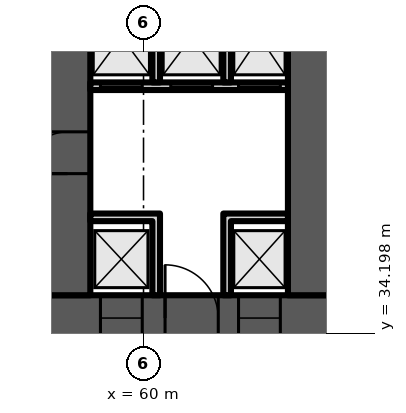
"""IFC4 building model, lengths in metres.
Left out: names, types, materials, properties, quantities, classifications, styles, units other than length and angle.
Written with IfcOpenShell. Run it as: python <this file> out.ifc"""

import sys

from ifc_helpers import new_model, si_unit, direction, frame, frame_2d, origin, place, context, subcontext, project, spatial, polyline, rectangle, outline, extrude, element, fill, save


model = new_model("IFC4")
c1 = context("Model", 3, precision=1e-05, world=origin(), true_north=direction((0.0, 1.0)))
c2 = subcontext(c1, "Body", "Model", "MODEL_VIEW")
j1 = project(units=[si_unit("LENGTHUNIT", "METRE"), si_unit("PLANEANGLEUNIT", "RADIAN")], contexts=[c1])
p1 = place(None, origin())
s1 = spatial("IfcSite", under=j1, at=p1, CompositionType="ELEMENT")
p2 = place(p1, origin())
s2 = spatial("IfcBuilding", under=s1, at=p2, CompositionType="ELEMENT")
p3 = place(p2, frame((0.0, 0.0, 91.9)))
s3 = spatial("IfcBuildingStorey", under=s2, at=p3, CompositionType="ELEMENT", Elevation=91.9)
p4 = place(p3, frame((9.0, 34.6, 0.0), z_axis=(0.0, 0.0, 1.0), x_axis=(1.0, 0.0, 0.0)))
e1 = element("IfcWall", 1, at=p4, inside=s3, PredefinedType="SHEAR", context=c2, shape_type="SweptSolid", body=[
    extrude(rectangle(XDim=56.0, YDim=1.2, at=frame_2d((28.0, 0.0))), origin(), (0.0, 0.0, 1.0), 4.8),
])
p5 = place(p4, frame((3.3, 0.0, 0.0)))
e2 = element("IfcOpeningElement", 2, at=p5, cuts=e1, PredefinedType="OPENING", context=c2, shape_type="SweptSolid", body=[
    extrude(rectangle(XDim=1.0, YDim=2.1, at=frame_2d((0.5, 1.05))), frame((0.0, 0.61, 0.0), z_axis=(0.0, -1.0, 0.0), x_axis=(1.0, 0.0, 0.0)), (0.0, 0.0, 1.0), 1.22),
])
p6 = place(p4, frame((7.867, 0.0, 0.0)))
e3 = element("IfcOpeningElement", 3, at=p6, cuts=e1, PredefinedType="OPENING", context=c2, shape_type="SweptSolid", body=[
    extrude(rectangle(XDim=1.1, YDim=2.1, at=frame_2d((0.55, 1.05))), frame((0.0, 0.61, 0.0), z_axis=(0.0, -1.0, 0.0), x_axis=(1.0, 0.0, 0.0)), (0.0, 0.0, 1.0), 1.22),
])
p7 = place(p4, frame((12.033, 0.0, 0.0)))
e4 = element("IfcOpeningElement", 4, at=p7, cuts=e1, PredefinedType="OPENING", context=c2, shape_type="SweptSolid", body=[
    extrude(rectangle(XDim=1.1, YDim=2.1, at=frame_2d((0.55, 1.05))), frame((0.0, 0.61, 0.0), z_axis=(0.0, -1.0, 0.0), x_axis=(1.0, 0.0, 0.0)), (0.0, 0.0, 1.0), 1.22),
])
p8 = place(p4, frame((9.8, 0.0, 0.0)))
e5 = element("IfcOpeningElement", 5, at=p8, cuts=e1, PredefinedType="OPENING", context=c2, shape_type="SweptSolid", body=[
    extrude(rectangle(XDim=1.4, YDim=2.1, at=frame_2d((0.7, 1.05))), frame((0.0, 0.61, 0.0), z_axis=(0.0, -1.0, 0.0), x_axis=(1.0, 0.0, 0.0)), (0.0, 0.0, 1.0), 1.22),
])
p9 = place(p4, frame((14.65, 0.0, 0.0)))
e6 = element("IfcOpeningElement", 6, at=p9, cuts=e1, PredefinedType="OPENING", context=c2, shape_type="SweptSolid", body=[
    extrude(rectangle(XDim=1.2, YDim=2.1, at=frame_2d((0.6, 1.05))), frame((0.0, 0.61, 0.0), z_axis=(0.0, -1.0, 0.0), x_axis=(1.0, 0.0, 0.0)), (0.0, 0.0, 1.0), 1.22),
])
p10 = place(p4, frame((21.867, 0.0, 0.0)))
e7 = element("IfcOpeningElement", 7, at=p10, cuts=e1, PredefinedType="OPENING", context=c2, shape_type="SweptSolid", body=[
    extrude(rectangle(XDim=1.1, YDim=2.1, at=frame_2d((0.55, 1.05))), frame((0.0, 0.61, 0.0), z_axis=(0.0, -1.0, 0.0), x_axis=(1.0, 0.0, 0.0)), (0.0, 0.0, 1.0), 1.22),
])
p11 = place(p4, frame((26.033, 0.0, 0.0)))
e8 = element("IfcOpeningElement", 8, at=p11, cuts=e1, PredefinedType="OPENING", context=c2, shape_type="SweptSolid", body=[
    extrude(rectangle(XDim=1.1, YDim=2.1, at=frame_2d((0.55, 1.05))), frame((0.0, 0.61, 0.0), z_axis=(0.0, -1.0, 0.0), x_axis=(1.0, 0.0, 0.0)), (0.0, 0.0, 1.0), 1.22),
])
p12 = place(p4, frame((23.8, 0.0, 0.0)))
e9 = element("IfcOpeningElement", 9, at=p12, cuts=e1, PredefinedType="OPENING", context=c2, shape_type="SweptSolid", body=[
    extrude(rectangle(XDim=1.4, YDim=2.1, at=frame_2d((0.7, 1.05))), frame((0.0, 0.61, 0.0), z_axis=(0.0, -1.0, 0.0), x_axis=(1.0, 0.0, 0.0)), (0.0, 0.0, 1.0), 1.22),
])
p13 = place(p4, frame((28.867, 0.0, 0.0)))
e10 = element("IfcOpeningElement", 10, at=p13, cuts=e1, PredefinedType="OPENING", context=c2, shape_type="SweptSolid", body=[
    extrude(rectangle(XDim=1.1, YDim=2.1, at=frame_2d((0.55, 1.05))), frame((0.0, 0.61, 0.0), z_axis=(0.0, -1.0, 0.0), x_axis=(1.0, 0.0, 0.0)), (0.0, 0.0, 1.0), 1.22),
])
p14 = place(p4, frame((33.033, 0.0, 0.0)))
e11 = element("IfcOpeningElement", 11, at=p14, cuts=e1, PredefinedType="OPENING", context=c2, shape_type="SweptSolid", body=[
    extrude(rectangle(XDim=1.1, YDim=2.1, at=frame_2d((0.55, 1.05))), frame((0.0, 0.61, 0.0), z_axis=(0.0, -1.0, 0.0), x_axis=(1.0, 0.0, 0.0)), (0.0, 0.0, 1.0), 1.22),
])
p15 = place(p4, frame((40.15, 0.0, 0.0)))
e12 = element("IfcOpeningElement", 12, at=p15, cuts=e1, PredefinedType="OPENING", context=c2, shape_type="SweptSolid", body=[
    extrude(rectangle(XDim=1.2, YDim=2.1, at=frame_2d((0.6, 1.05))), frame((0.0, 0.61, 0.0), z_axis=(0.0, -1.0, 0.0), x_axis=(1.0, 0.0, 0.0)), (0.0, 0.0, 1.0), 1.22),
])
p16 = place(p4, frame((44.8, 0.0, 0.0)))
e13 = element("IfcOpeningElement", 13, at=p16, cuts=e1, PredefinedType="OPENING", context=c2, shape_type="SweptSolid", body=[
    extrude(rectangle(XDim=1.4, YDim=2.1, at=frame_2d((0.7, 1.05))), frame((0.0, 0.61, 0.0), z_axis=(0.0, -1.0, 0.0), x_axis=(1.0, 0.0, 0.0)), (0.0, 0.0, 1.0), 1.22),
])
p17 = place(p4, frame((49.867, 0.0, 0.0)))
e14 = element("IfcOpeningElement", 14, at=p17, cuts=e1, PredefinedType="OPENING", context=c2, shape_type="SweptSolid", body=[
    extrude(rectangle(XDim=1.1, YDim=2.1, at=frame_2d((0.55, 1.05))), frame((0.0, 0.61, 0.0), z_axis=(0.0, -1.0, 0.0), x_axis=(1.0, 0.0, 0.0)), (0.0, 0.0, 1.0), 1.22),
])
p18 = place(p4, frame((53.5, 0.0, 0.0)))
e15 = element("IfcOpeningElement", 15, at=p18, cuts=e1, PredefinedType="OPENING", context=c2, shape_type="SweptSolid", body=[
    extrude(rectangle(XDim=1.1, YDim=2.1, at=frame_2d((0.55, 1.05))), frame((0.0, 0.61, 0.0), z_axis=(0.0, -1.0, 0.0), x_axis=(1.0, 0.0, 0.0)), (0.0, 0.0, 1.0), 1.22),
])
p19 = place(p4, frame((51.567, 0.0, 0.0)))
e16 = element("IfcOpeningElement", 16, at=p19, cuts=e1, PredefinedType="OPENING", context=c2, shape_type="SweptSolid", body=[
    extrude(rectangle(XDim=1.4, YDim=2.1, at=frame_2d((0.7, 1.05))), frame((0.0, 0.61, 0.0), z_axis=(0.0, -1.0, 0.0), x_axis=(1.0, 0.0, 0.0)), (0.0, 0.0, 1.0), 1.22),
])
p20 = place(p3, frame((58.0, 35.2, 0.0), z_axis=(0.0, 0.0, 1.0), x_axis=(0.0, 1.0, 0.0)))
e17 = element("IfcWall", 17, at=p20, inside=s3, PredefinedType="SHEAR", context=c2, shape_type="SweptSolid", body=[
    extrude(rectangle(XDim=12.943, YDim=1.2, at=frame_2d((6.471, 0.0))), origin(), (0.0, 0.0, 1.0), 4.8),
])
p21 = place(p20, frame((10.134, 0.0, 0.0)))
e18 = element("IfcOpeningElement", 18, at=p21, cuts=e17, PredefinedType="OPENING", context=c2, shape_type="SweptSolid", body=[
    extrude(rectangle(XDim=1.0, YDim=2.1, at=frame_2d((0.5, 1.05))), frame((0.0, 0.61, 0.0), z_axis=(0.0, -1.0, 0.0), x_axis=(1.0, 0.0, 0.0)), (0.0, 0.0, 1.0), 1.22),
])
p22 = place(p20, frame((3.2, 0.0, 0.0)))
e19 = element("IfcOpeningElement", 19, at=p22, cuts=e17, PredefinedType="OPENING", context=c2, shape_type="SweptSolid", body=[
    extrude(rectangle(XDim=1.1, YDim=2.1, at=frame_2d((0.55, 1.05))), frame((0.0, 0.61, 0.0), z_axis=(0.0, -1.0, 0.0), x_axis=(1.0, 0.0, 0.0)), (0.0, 0.0, 1.0), 1.22),
])
p23 = place(p3, frame((64.4, 35.2, 0.0), z_axis=(0.0, 0.0, 1.0), x_axis=(0.0, 1.0, 0.0)))
e20 = element("IfcWall", 20, at=p23, inside=s3, PredefinedType="SHEAR", context=c2, shape_type="SweptSolid", body=[
    extrude(rectangle(XDim=12.383, YDim=1.2, at=frame_2d((6.191, 0.0))), origin(), (0.0, 0.0, 1.0), 4.8),
])
p24 = place(p3, frame((58.6, 40.7, 0.0), z_axis=(0.0, 0.0, 1.0), x_axis=(1.0, 0.0, 0.0)))
e21 = element("IfcWall", 21, at=p24, inside=s3, PredefinedType="PARTITIONING", context=c2, shape_type="SweptSolid", body=[
    extrude(rectangle(XDim=5.2, YDim=0.2, at=frame_2d((2.6, 0.0))), origin(), (0.0, 0.0, 1.0), 4.4),
])
p25 = place(p24, frame((0.267, 0.0, 0.0)))
e22 = element("IfcOpeningElement", 22, at=p25, cuts=e21, PredefinedType="OPENING", context=c2, shape_type="SweptSolid", body=[
    extrude(rectangle(XDim=1.1, YDim=2.1, at=frame_2d((0.55, 1.05))), frame((0.0, 0.11, 0.0), z_axis=(0.0, -1.0, 0.0), x_axis=(1.0, 0.0, 0.0)), (0.0, 0.0, 1.0), 0.22),
])
p26 = place(p24, frame((2.117, 0.0, 0.0)))
e23 = element("IfcOpeningElement", 23, at=p26, cuts=e21, PredefinedType="OPENING", context=c2, shape_type="SweptSolid", body=[
    extrude(rectangle(XDim=1.1, YDim=2.1, at=frame_2d((0.55, 1.05))), frame((0.0, 0.11, 0.0), z_axis=(0.0, -1.0, 0.0), x_axis=(1.0, 0.0, 0.0)), (0.0, 0.0, 1.0), 0.22),
])
p27 = place(p24, frame((3.9, 0.0, 0.0)))
e24 = element("IfcOpeningElement", 24, at=p27, cuts=e21, PredefinedType="OPENING", context=c2, shape_type="SweptSolid", body=[
    extrude(rectangle(XDim=1.1, YDim=2.1, at=frame_2d((0.55, 1.05))), frame((0.0, 0.11, 0.0), z_axis=(0.0, -1.0, 0.0), x_axis=(1.0, 0.0, 0.0)), (0.0, 0.0, 1.0), 0.22),
])
p28 = place(p3, origin())
e25 = element("IfcWall", 25, at=p28, inside=s3, PredefinedType="PARTITIONING", context=c2, shape_type="SweptSolid", body=[
    extrude(outline(polyline([(60.233, 37.15), (58.6, 37.15), (58.6, 37.35), (60.233, 37.35), (60.433, 37.35), (60.433, 35.2), (60.233, 35.2), (60.233, 37.15)])), origin(), (0.0, 0.0, 1.0), 4.4),
])
p29 = place(p3, origin())
e26 = element("IfcWall", 26, at=p29, inside=s3, PredefinedType="PARTITIONING", context=c2, shape_type="SweptSolid", body=[
    extrude(outline(polyline([(62.1, 37.35), (62.3, 37.35), (63.8, 37.35), (63.8, 37.15), (62.3, 37.15), (62.3, 35.2), (62.1, 35.2), (62.1, 37.35)])), origin(), (0.0, 0.0, 1.0), 4.4),
])
p30 = place(p3, origin())
e27 = element("IfcWall", 27, at=p30, inside=s3, PredefinedType="PARTITIONING", context=c2, shape_type="SweptSolid", body=[
    extrude(outline(polyline([(60.433, 40.8), (60.233, 40.8), (60.233, 43.8), (58.6, 43.8), (58.6, 44.0), (63.8, 44.0), (63.8, 43.8), (62.3, 43.8), (62.3, 40.8), (62.1, 40.8), (62.1, 43.8), (60.433, 43.8), (60.433, 40.8)])), origin(), (0.0, 0.0, 1.0), 4.4),
])
p31 = place(p17, origin())
e28 = element("IfcDoor", 28, at=p31, inside=s3, OperationType="DOUBLE_DOOR_SLIDING", PredefinedType="DOOR", context=c2, shape_type="SweptSolid", body=[
    extrude(rectangle(XDim=1.1, YDim=2.1, at=frame_2d((0.55, 1.05))), frame((0.0, 0.025, 0.0), z_axis=(0.0, -1.0, 0.0), x_axis=(1.0, 0.0, 0.0)), (0.0, 0.0, 1.0), 0.05),
])
fill(e14, e28)
p32 = place(p18, origin())
e29 = element("IfcDoor", 29, at=p32, inside=s3, OperationType="DOUBLE_DOOR_SLIDING", PredefinedType="DOOR", context=c2, shape_type="SweptSolid", body=[
    extrude(rectangle(XDim=1.1, YDim=2.1, at=frame_2d((0.55, 1.05))), frame((0.0, 0.025, 0.0), z_axis=(0.0, -1.0, 0.0), x_axis=(1.0, 0.0, 0.0)), (0.0, 0.0, 1.0), 0.05),
])
fill(e15, e29)
p33 = place(p19, origin())
e30 = element("IfcDoor", 30, at=p33, inside=s3, OperationType="DOUBLE_DOOR_SINGLE_SWING", PredefinedType="DOOR", context=c2, shape_type="SweptSolid", body=[
    extrude(rectangle(XDim=1.4, YDim=2.1, at=frame_2d((0.7, 1.05))), frame((0.0, 0.025, 0.0), z_axis=(0.0, -1.0, 0.0), x_axis=(1.0, 0.0, 0.0)), (0.0, 0.0, 1.0), 0.05),
])
fill(e16, e30)
p34 = place(p25, origin())
e31 = element("IfcDoor", 31, at=p34, inside=s3, OperationType="DOUBLE_DOOR_SLIDING", PredefinedType="DOOR", context=c2, shape_type="SweptSolid", body=[
    extrude(rectangle(XDim=1.1, YDim=2.1, at=frame_2d((0.55, 1.05))), frame((0.0, 0.025, 0.0), z_axis=(0.0, -1.0, 0.0), x_axis=(1.0, 0.0, 0.0)), (0.0, 0.0, 1.0), 0.05),
])
fill(e22, e31)
p35 = place(p26, origin())
e32 = element("IfcDoor", 32, at=p35, inside=s3, OperationType="DOUBLE_DOOR_SLIDING", PredefinedType="DOOR", context=c2, shape_type="SweptSolid", body=[
    extrude(rectangle(XDim=1.1, YDim=2.1, at=frame_2d((0.55, 1.05))), frame((0.0, 0.025, 0.0), z_axis=(0.0, -1.0, 0.0), x_axis=(1.0, 0.0, 0.0)), (0.0, 0.0, 1.0), 0.05),
])
fill(e23, e32)
p36 = place(p27, origin())
e33 = element("IfcDoor", 33, at=p36, inside=s3, OperationType="DOUBLE_DOOR_SLIDING", PredefinedType="DOOR", context=c2, shape_type="SweptSolid", body=[
    extrude(rectangle(XDim=1.1, YDim=2.1, at=frame_2d((0.55, 1.05))), frame((0.0, 0.025, 0.0), z_axis=(0.0, -1.0, 0.0), x_axis=(1.0, 0.0, 0.0)), (0.0, 0.0, 1.0), 0.05),
])
fill(e24, e33)
p37 = place(p22, origin())
e34 = element("IfcDoor", 34, at=p37, inside=s3, OperationType="SINGLE_SWING_LEFT", PredefinedType="DOOR", context=c2, shape_type="SweptSolid", body=[
    extrude(rectangle(XDim=1.1, YDim=2.1, at=frame_2d((0.55, 1.05))), frame((0.0, 0.025, 0.0), z_axis=(0.0, -1.0, 0.0), x_axis=(1.0, 0.0, 0.0)), (0.0, 0.0, 1.0), 0.05),
])
fill(e19, e34)
save(model, sys.argv[1])
